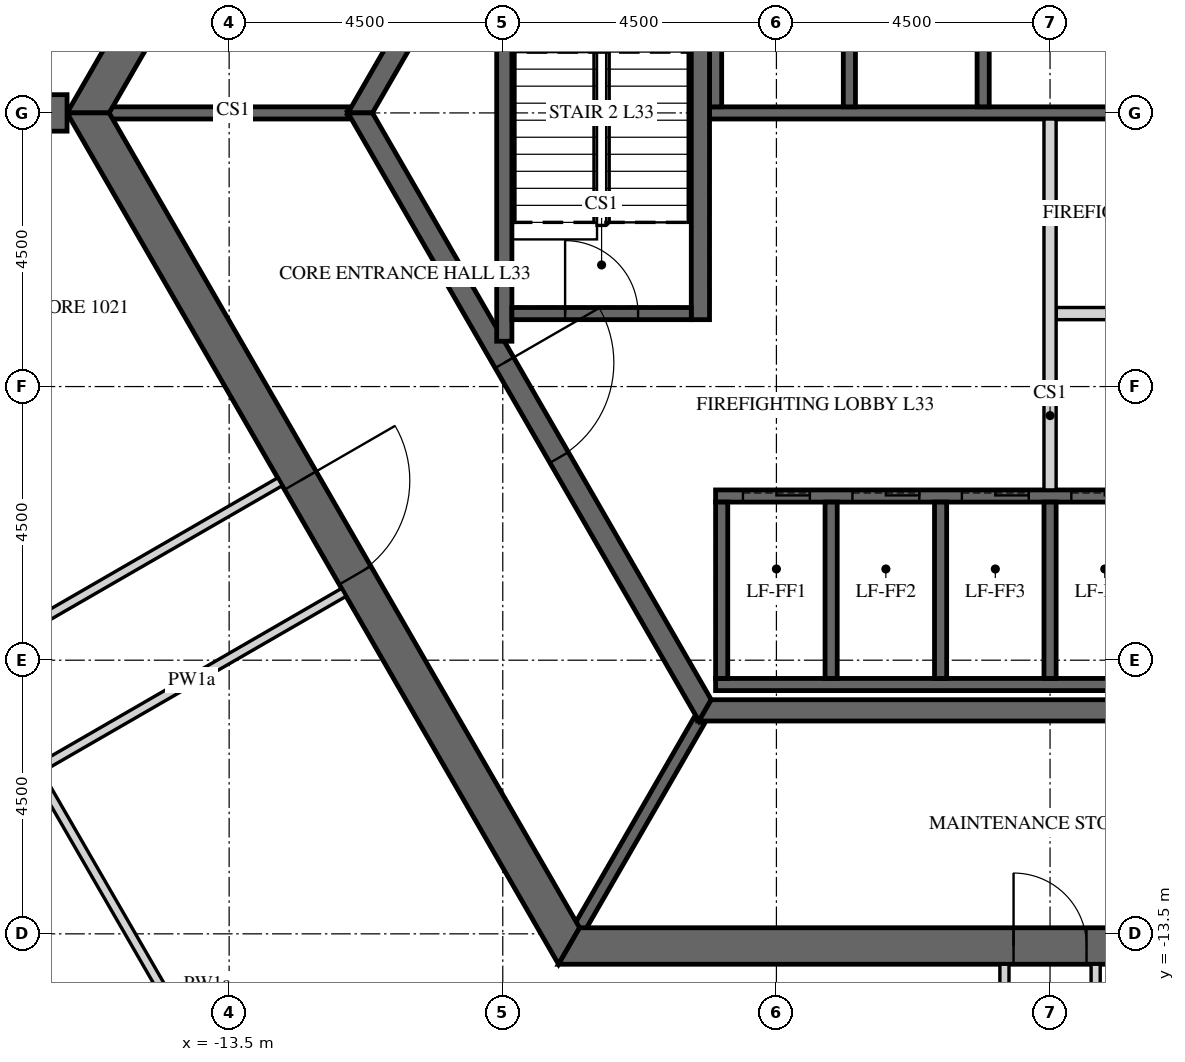
"""IFC4 building model, lengths in metres.
Left out: names, types, materials, properties, quantities, classifications, styles, units other than length and angle.
Written with IfcOpenShell. Run it as: python <this file> out.ifc"""

import sys

from ifc_helpers import new_model, si_unit, direction, frame, frame_2d, origin, place, context, subcontext, project, spatial, polyline, rectangle, outline, extrude, element, fill, save


model = new_model("IFC4")
c1 = context("Model", 3, precision=1e-05, world=origin(), true_north=direction((0.0, 1.0)))
c2 = subcontext(c1, "Body", "Model", "MODEL_VIEW")
j1 = project(units=[si_unit("LENGTHUNIT", "METRE"), si_unit("PLANEANGLEUNIT", "RADIAN")], contexts=[c1])
p1 = place(None, origin())
s1 = spatial("IfcSite", under=j1, at=p1, CompositionType="ELEMENT")
p2 = place(p1, origin())
s2 = spatial("IfcBuilding", under=s1, at=p2, CompositionType="ELEMENT")
p3 = place(p2, frame((0.0, 0.0, 142.8)))
s3 = spatial("IfcBuildingStorey", under=s2, at=p3, CompositionType="ELEMENT", Elevation=142.8)
p4 = place(p3, frame((-7.91, 13.7, -0.15), z_axis=(0.0, 0.0, 1.0), x_axis=(-0.499999880136, -0.866025472988, 0.0)))
e1 = element("IfcWall", 1, at=p4, inside=s3, PredefinedType="SHEAR", context=c2, shape_type="SweptSolid", body=[
    extrude(outline(polyline([(-0.173, -0.3), (15.993, -0.3), (15.646, 0.3), (0.173, 0.3), (-0.173, -0.3)])), origin(), (0.0, 0.0, 1.0), 3.75),
])
p5 = place(p4, frame((7.039, 0.0, 0.15)))
e2 = element("IfcOpeningElement", 2, at=p5, cuts=e1, PredefinedType="OPENING", context=c2, shape_type="SweptSolid", body=[
    extrude(rectangle(XDim=1.8, YDim=2.4, at=frame_2d((0.9, 1.2))), frame((0.0, 0.31, 0.0), z_axis=(0.0, -1.0, 0.0), x_axis=(1.0, 0.0, 0.0)), (0.0, 0.0, 1.0), 0.62),
])
p6 = place(p3, frame((-15.819, 0.0, -0.15), z_axis=(0.0, 0.0, 1.0), x_axis=(0.499999880136, -0.866025472988, 0.0)))
e3 = element("IfcWall", 3, at=p6, inside=s3, PredefinedType="SHEAR", context=c2, shape_type="SweptSolid", body=[
    extrude(outline(polyline([(-0.173, -0.3), (15.993, -0.3), (15.646, 0.3), (0.173, 0.3), (-0.173, -0.3)])), origin(), (0.0, 0.0, 1.0), 3.75),
])
p7 = place(p6, frame((6.981, 0.0, 0.15)))
e4 = element("IfcOpeningElement", 4, at=p7, cuts=e3, PredefinedType="OPENING", context=c2, shape_type="SweptSolid", body=[
    extrude(rectangle(XDim=1.8, YDim=2.4, at=frame_2d((0.9, 1.2))), frame((0.0, 0.31, 0.0), z_axis=(0.0, -1.0, 0.0), x_axis=(1.0, 0.0, 0.0)), (0.0, 0.0, 1.0), 0.62),
])
p8 = place(p3, frame((-7.91, -13.7, -0.15), z_axis=(0.0, 0.0, 1.0), x_axis=(1.0, 0.0, 0.0)))
e5 = element("IfcWall", 5, at=p8, inside=s3, PredefinedType="SHEAR", context=c2, shape_type="SweptSolid", body=[
    extrude(outline(polyline([(-0.173, -0.3), (15.993, -0.3), (15.646, 0.3), (0.173, 0.3), (-0.173, -0.3)])), origin(), (0.0, 0.0, 1.0), 3.75),
])
p9 = place(p8, frame((7.31, 0.0, 0.15)))
e6 = element("IfcOpeningElement", 6, at=p9, cuts=e5, PredefinedType="OPENING", context=c2, shape_type="SweptSolid", body=[
    extrude(rectangle(XDim=1.2, YDim=2.4, at=frame_2d((0.6, 1.2))), frame((0.0, 0.31, 0.0), z_axis=(0.0, -1.0, 0.0), x_axis=(1.0, 0.0, 0.0)), (0.0, 0.0, 1.0), 0.62),
])
p10 = place(p3, frame((-16.166, 0.0, -0.15), z_axis=(0.0, 0.0, 1.0), x_axis=(-1.0, 0.0, 0.0)))
e7 = element("IfcWall", 7, at=p10, inside=s3, PredefinedType="SHEAR", context=c2, shape_type="SweptSolid", body=[
    extrude(rectangle(XDim=16.509, YDim=0.6, at=frame_2d((8.254, 0.0))), origin(), (0.0, 0.0, 1.0), 3.75),
])
p11 = place(p10, frame((7.354, 0.0, 0.15)))
e8 = element("IfcOpeningElement", 8, at=p11, cuts=e7, PredefinedType="OPENING", context=c2, shape_type="SweptSolid", body=[
    extrude(rectangle(XDim=1.8, YDim=2.4, at=frame_2d((0.9, 1.2))), frame((0.0, 0.31, 0.0), z_axis=(0.0, -1.0, 0.0), x_axis=(1.0, 0.0, 0.0)), (0.0, 0.0, 1.0), 0.62),
])
p12 = place(p3, frame((-5.673, 9.825, -0.15), z_axis=(0.0, 0.0, 1.0), x_axis=(-0.499995046907, -0.866028263435, 0.0)))
e9 = element("IfcWall", 9, at=p12, inside=s3, PredefinedType="SHEAR", context=c2, shape_type="SweptSolid", body=[
    extrude(outline(polyline([(-0.101, -0.175), (11.446, -0.175), (11.244, 0.175), (0.101, 0.175), (-0.101, -0.175)])), origin(), (0.0, 0.0, 1.0), 3.75),
])
p13 = place(p12, frame((4.801, 0.0, 0.15)))
e10 = element("IfcOpeningElement", 10, at=p13, cuts=e9, PredefinedType="OPENING", context=c2, shape_type="SweptSolid", body=[
    extrude(rectangle(XDim=1.8, YDim=2.4, at=frame_2d((0.9, 1.2))), frame((0.0, 0.185, 0.0), z_axis=(0.0, -1.0, 0.0), x_axis=(1.0, 0.0, 0.0)), (0.0, 0.0, 1.0), 0.37),
])
p14 = place(p3, frame((-11.345, 0.0, -0.15), z_axis=(0.0, 0.0, 1.0), x_axis=(0.499995046907, -0.866028263435, 0.0)))
e11 = element("IfcWall", 11, at=p14, inside=s3, PredefinedType="SHEAR", context=c2, shape_type="SweptSolid", body=[
    extrude(outline(polyline([(-0.101, -0.175), (11.446, -0.175), (11.244, 0.175), (0.101, 0.175), (-0.101, -0.175)])), origin(), (0.0, 0.0, 1.0), 3.75),
])
p15 = place(p14, frame((4.744, 0.0, 0.15)))
e12 = element("IfcOpeningElement", 12, at=p15, cuts=e11, PredefinedType="OPENING", context=c2, shape_type="SweptSolid", body=[
    extrude(rectangle(XDim=1.8, YDim=2.4, at=frame_2d((0.9, 1.2))), frame((0.0, 0.185, 0.0), z_axis=(0.0, -1.0, 0.0), x_axis=(1.0, 0.0, 0.0)), (0.0, 0.0, 1.0), 0.37),
])
p16 = place(p3, frame((-5.673, -9.825, -0.15), z_axis=(0.0, 0.0, 1.0), x_axis=(1.0, 0.0, 0.0)))
e13 = element("IfcWall", 13, at=p16, inside=s3, PredefinedType="SHEAR", context=c2, shape_type="SweptSolid", body=[
    extrude(outline(polyline([(-0.101, -0.175), (11.446, -0.175), (11.244, 0.175), (0.101, 0.175), (-0.101, -0.175)])), origin(), (0.0, 0.0, 1.0), 3.75),
])
p17 = place(p3, frame((-5.6, 0.0, -0.25), z_axis=(0.0, 0.0, 1.0), x_axis=(1.0, 0.0, 0.0)))
e14 = element("IfcWall", 14, at=p17, inside=s3, PredefinedType="SHEAR", context=c2, shape_type="SweptSolid", body=[
    extrude(rectangle(XDim=11.2, YDim=0.2, at=frame_2d((5.6, 0.0))), origin(), (0.0, 0.0, 1.0), 3.9),
])
for number, where, z_axis, x_axis in (
    (15, (-5.5, 0.1, -0.25), (0.0, 0.0, 1.0), (0.0, 1.0, 0.0)),
    (16, (-3.3, 0.1, -0.25), (0.0, 0.0, 1.0), (0.0, 1.0, 0.0)),
    (17, (-1.1, 0.1, -0.25), (0.0, 0.0, 1.0), (0.0, 1.0, 0.0)),
):
    element("IfcWall", number, at=place(p3, frame(where, z_axis=z_axis, x_axis=x_axis)), inside=s3, PredefinedType="SHEAR", context=c2, shape_type="SweptSolid", body=[
        extrude(rectangle(XDim=3.1, YDim=0.2, at=frame_2d((1.55, 0.0))), origin(), (0.0, 0.0, 1.0), 3.9),
    ])
p18 = place(p3, frame((-5.5, -6.3, -0.25), z_axis=(0.0, 0.0, 1.0), x_axis=(1.0, 0.0, 0.0)))
e18 = element("IfcWall", 18, at=p18, inside=s3, PredefinedType="SHEAR", context=c2, shape_type="SweptSolid", body=[
    extrude(rectangle(XDim=9.2, YDim=0.2, at=frame_2d((4.6, 0.0))), origin(), (0.0, 0.0, 1.0), 3.9),
])
p19 = place(p18, frame((0.45, 0.0, 0.25)))
e19 = element("IfcOpeningElement", 19, at=p19, cuts=e18, PredefinedType="OPENING", context=c2, shape_type="SweptSolid", body=[
    extrude(rectangle(XDim=1.1, YDim=2.1, at=frame_2d((0.55, 1.05))), frame((0.0, 0.11, 0.0), z_axis=(0.0, -1.0, 0.0), x_axis=(1.0, 0.0, 0.0)), (0.0, 0.0, 1.0), 0.22),
])
p20 = place(p18, frame((2.25, 0.0, 0.25)))
e20 = element("IfcOpeningElement", 20, at=p20, cuts=e18, PredefinedType="OPENING", context=c2, shape_type="SweptSolid", body=[
    extrude(rectangle(XDim=1.1, YDim=2.1, at=frame_2d((0.55, 1.05))), frame((0.0, 0.11, 0.0), z_axis=(0.0, -1.0, 0.0), x_axis=(1.0, 0.0, 0.0)), (0.0, 0.0, 1.0), 0.22),
])
p21 = place(p18, frame((4.05, 0.0, 0.25)))
e21 = element("IfcOpeningElement", 21, at=p21, cuts=e18, PredefinedType="OPENING", context=c2, shape_type="SweptSolid", body=[
    extrude(rectangle(XDim=1.1, YDim=2.1, at=frame_2d((0.55, 1.05))), frame((0.0, 0.11, 0.0), z_axis=(0.0, -1.0, 0.0), x_axis=(1.0, 0.0, 0.0)), (0.0, 0.0, 1.0), 0.22),
])
p22 = place(p18, frame((5.85, 0.0, 0.25)))
e22 = element("IfcOpeningElement", 22, at=p22, cuts=e18, PredefinedType="OPENING", context=c2, shape_type="SweptSolid", body=[
    extrude(rectangle(XDim=1.1, YDim=2.1, at=frame_2d((0.55, 1.05))), frame((0.0, 0.11, 0.0), z_axis=(0.0, -1.0, 0.0), x_axis=(1.0, 0.0, 0.0)), (0.0, 0.0, 1.0), 0.22),
])
p23 = place(p18, frame((7.65, 0.0, 0.25)))
e23 = element("IfcOpeningElement", 23, at=p23, cuts=e18, PredefinedType="OPENING", context=c2, shape_type="SweptSolid", body=[
    extrude(rectangle(XDim=1.1, YDim=2.1, at=frame_2d((0.55, 1.05))), frame((0.0, 0.11, 0.0), z_axis=(0.0, -1.0, 0.0), x_axis=(1.0, 0.0, 0.0)), (0.0, 0.0, 1.0), 0.22),
])
p24 = place(p3, frame((-5.5, -9.4, -0.25), z_axis=(0.0, 0.0, 1.0), x_axis=(1.0, 0.0, 0.0)))
e24 = element("IfcWall", 24, at=p24, inside=s3, PredefinedType="SHEAR", context=c2, shape_type="SweptSolid", body=[
    extrude(rectangle(XDim=9.2, YDim=0.2, at=frame_2d((4.6, 0.0))), origin(), (0.0, 0.0, 1.0), 3.9),
])
for number, where, z_axis, x_axis in (
    (25, (-5.4, -9.3, -0.25), (0.0, 0.0, 1.0), (0.0, 1.0, 0.0)),
    (26, (-3.6, -9.3, -0.25), (0.0, 0.0, 1.0), (0.0, 1.0, 0.0)),
    (27, (-1.8, -9.3, -0.25), (0.0, 0.0, 1.0), (0.0, 1.0, 0.0)),
    (28, (0.0, -9.3, -0.25), (0.0, 0.0, 1.0), (0.0, 1.0, 0.0)),
):
    element("IfcWall", number, at=place(p3, frame(where, z_axis=z_axis, x_axis=x_axis)), inside=s3, PredefinedType="SHEAR", context=c2, shape_type="SweptSolid", body=[
        extrude(rectangle(XDim=2.9, YDim=0.2, at=frame_2d((1.45, 0.0))), origin(), (0.0, 0.0, 1.0), 3.9),
    ])
p25 = place(p3, frame((0.1, -3.3, 0.0), z_axis=(0.0, 0.0, 1.0), x_axis=(1.0, 0.0, 0.0)))
e29 = element("IfcWall", 29, at=p25, inside=s3, PredefinedType="PARTITIONING", context=c2, shape_type="SweptSolid", body=[
    extrude(rectangle(XDim=5.5, YDim=0.2, at=frame_2d((2.75, 0.0))), origin(), (0.0, 0.0, 1.0), 3.65),
])
p26 = place(p25, frame((2.3, 0.0, 0.0)))
e30 = element("IfcOpeningElement", 30, at=p26, cuts=e29, PredefinedType="OPENING", context=c2, shape_type="SweptSolid", body=[
    extrude(rectangle(XDim=0.9, YDim=2.1, at=frame_2d((0.45, 1.05))), frame((0.0, 0.11, 0.0), z_axis=(0.0, -1.0, 0.0), x_axis=(1.0, 0.0, 0.0)), (0.0, 0.0, 1.0), 0.22),
])
p27 = place(p3, frame((0.0, -6.2, 0.0), z_axis=(0.0, 0.0, 1.0), x_axis=(0.0, 1.0, 0.0)))
e31 = element("IfcWall", 31, at=p27, inside=s3, PredefinedType="PARTITIONING", context=c2, shape_type="SweptSolid", body=[
    extrude(rectangle(XDim=6.1, YDim=0.2, at=frame_2d((3.05, 0.0))), origin(), (0.0, 0.0, 1.0), 3.65),
])
p28 = place(p3, frame((-11.547, 0.0, -0.15), z_axis=(0.0, 0.0, 1.0), x_axis=(-1.0, 0.0, 0.0)))
e32 = element("IfcWall", 32, at=p28, inside=s3, PredefinedType="SHEAR", context=c2, shape_type="SweptSolid", body=[
    extrude(rectangle(XDim=3.926, YDim=0.2, at=frame_2d((1.963, 0.0))), origin(), (0.0, 0.0, 1.0), 3.75),
])
p29 = place(p3, frame((-5.773, -10.0, -0.15), z_axis=(0.0, 0.0, 1.0), x_axis=(-0.500038251005, -0.86600331843, 0.0)))
e33 = element("IfcWall", 33, at=p29, inside=s3, PredefinedType="SHEAR", context=c2, shape_type="SweptSolid", body=[
    extrude(rectangle(XDim=3.926, YDim=0.2, at=frame_2d((1.963, 0.0))), origin(), (0.0, 0.0, 1.0), 3.75),
])
p30 = place(p3, frame((-5.75, -3.4, -0.25), z_axis=(0.0, 0.0, 1.0), x_axis=(0.0, 1.0, 0.0)))
e34 = element("IfcWall", 34, at=p30, inside=s3, PredefinedType="SHEAR", context=c2, shape_type="SweptSolid", body=[
    extrude(rectangle(XDim=6.8, YDim=0.3, at=frame_2d((3.4, 0.0))), origin(), (0.0, 0.0, 1.0), 3.9),
])
p31 = place(p3, frame((-8.975, -3.755, -0.25), z_axis=(0.0, 0.0, 1.0), x_axis=(0.0, 1.0, 0.0)))
e35 = element("IfcWall", 35, at=p31, inside=s3, PredefinedType="SHEAR", context=c2, shape_type="SweptSolid", body=[
    extrude(rectangle(XDim=7.51, YDim=0.25, at=frame_2d((3.755, 0.0))), origin(), (0.0, 0.0, 1.0), 3.9),
])
p32 = place(p3, frame((-8.85, -3.3, -0.25), z_axis=(0.0, 0.0, 1.0), x_axis=(1.0, 0.0, 0.0)))
e36 = element("IfcWall", 36, at=p32, inside=s3, PredefinedType="SHEAR", context=c2, shape_type="SweptSolid", body=[
    extrude(rectangle(XDim=2.95, YDim=0.2, at=frame_2d((1.475, 0.0))), origin(), (0.0, 0.0, 1.0), 3.9),
])
p33 = place(p32, frame((0.875, 0.0, 0.25)))
e37 = element("IfcOpeningElement", 37, at=p33, cuts=e36, PredefinedType="OPENING", context=c2, shape_type="SweptSolid", body=[
    extrude(rectangle(XDim=1.2, YDim=2.4, at=frame_2d((0.6, 1.2))), frame((0.0, 0.11, 0.0), z_axis=(0.0, -1.0, 0.0), x_axis=(1.0, 0.0, 0.0)), (0.0, 0.0, 1.0), 0.22),
])
p34 = place(p3, frame((-23.743, -2.175, 0.0), z_axis=(0.0, 0.0, 1.0), x_axis=(0.499992353047, -0.86602981871, 0.0)))
e38 = element("IfcWall", 38, at=p34, inside=s3, PredefinedType="PARTITIONING", context=c2, shape_type="SweptSolid", body=[
    extrude(rectangle(XDim=23.516, YDim=0.15, at=frame_2d((11.758, 0.0))), origin(), (0.0, 0.0, 1.0), 2.838),
])
p35 = place(p34, frame((10.099, 0.0, 0.0)))
e39 = element("IfcOpeningElement", 39, at=p35, cuts=e38, PredefinedType="OPENING", context=c2, shape_type="SweptSolid", body=[
    extrude(rectangle(XDim=1.0, YDim=2.1, at=frame_2d((0.5, 1.05))), frame((0.0, 0.085, 0.0), z_axis=(0.0, -1.0, 0.0), x_axis=(1.0, 0.0, 0.0)), (0.0, 0.0, 1.0), 0.17),
])
p36 = place(p34, frame((17.358, 0.0, 0.0)))
e40 = element("IfcOpeningElement", 40, at=p36, cuts=e38, PredefinedType="OPENING", context=c2, shape_type="SweptSolid", body=[
    extrude(rectangle(XDim=1.0, YDim=2.1, at=frame_2d((0.5, 1.05))), frame((0.0, 0.085, 0.0), z_axis=(0.0, -1.0, 0.0), x_axis=(1.0, 0.0, 0.0)), (0.0, 0.0, 1.0), 0.17),
])
p37 = place(p3, frame((-12.664, -6.066, 0.0), z_axis=(0.0, 0.0, 1.0), x_axis=(-0.866018092707, -0.500012662943, 0.0)))
e41 = element("IfcWall", 41, at=p37, inside=s3, PredefinedType="PARTITIONING", context=c2, shape_type="SweptSolid", body=[
    extrude(rectangle(XDim=5.85, YDim=0.15, at=frame_2d((2.925, 0.0))), origin(), (0.0, 0.0, 1.0), 2.838),
])
p38 = place(p3, frame((-0.75, -14.0, 0.0), z_axis=(0.0, 0.0, 1.0), x_axis=(0.0, -1.0, 0.0)))
e42 = element("IfcWall", 42, at=p38, inside=s3, PredefinedType="PARTITIONING", context=c2, shape_type="SweptSolid", body=[
    extrude(rectangle(XDim=5.951, YDim=0.15, at=frame_2d((2.976, 0.0))), origin(), (0.0, 0.0, 1.0), 2.838),
])
p39 = place(p3, frame((-11.031, -20.595, 0.0), z_axis=(0.0, 0.0, 1.0), x_axis=(-0.499987422378, 0.866032665356, 0.0)))
e43 = element("IfcWall", 43, at=p39, inside=s3, PredefinedType="PARTITIONING", context=c2, shape_type="SweptSolid", body=[
    extrude(rectangle(XDim=11.299, YDim=0.15, at=frame_2d((5.649, 0.0))), origin(), (0.0, 0.0, 1.0), 2.838),
])
p40 = place(p39, frame((5.199, 0.0, 0.0)))
e44 = element("IfcOpeningElement", 44, at=p40, cuts=e43, PredefinedType="OPENING", context=c2, shape_type="SweptSolid", body=[
    extrude(rectangle(XDim=0.9, YDim=2.1, at=frame_2d((0.45, 1.05))), frame((0.0, 0.085, 0.0), z_axis=(0.0, -1.0, 0.0), x_axis=(1.0, 0.0, 0.0)), (0.0, 0.0, 1.0), 0.17),
])
p41 = place(p3, frame((-16.615, -10.772, 0.0), z_axis=(0.0, 0.0, 1.0), x_axis=(0.866025774745, 0.499999357477, 0.0)))
e45 = element("IfcWall", 45, at=p41, inside=s3, PredefinedType="PARTITIONING", context=c2, shape_type="SweptSolid", body=[
    extrude(rectangle(XDim=5.775, YDim=0.15, at=frame_2d((2.887, 0.0))), origin(), (0.0, 0.0, 1.0), 2.838),
])
p42 = place(p3, frame((0.75, -19.771, 0.0), z_axis=(0.0, 0.0, 1.0), x_axis=(0.0, 1.0, 0.0)))
e46 = element("IfcWall", 46, at=p42, inside=s3, PredefinedType="PARTITIONING", context=c2, shape_type="SweptSolid", body=[
    extrude(rectangle(XDim=5.771, YDim=0.15, at=frame_2d((2.885, 0.0))), origin(), (0.0, 0.0, 1.0), 2.838),
])
p43 = place(p7, origin())
e47 = element("IfcDoor", 47, at=p43, inside=s3, OperationType="DOUBLE_DOOR_SINGLE_SWING", PredefinedType="DOOR", context=c2, shape_type="SweptSolid", body=[
    extrude(rectangle(XDim=1.8, YDim=2.4, at=frame_2d((0.9, 1.2))), frame((0.0, 0.025, 0.0), z_axis=(0.0, -1.0, 0.0), x_axis=(1.0, 0.0, 0.0)), (0.0, 0.0, 1.0), 0.05),
])
fill(e4, e47)
p44 = place(p9, origin())
e48 = element("IfcDoor", 48, at=p44, inside=s3, OperationType="SINGLE_SWING_LEFT", PredefinedType="DOOR", context=c2, shape_type="SweptSolid", body=[
    extrude(rectangle(XDim=1.2, YDim=2.4, at=frame_2d((0.6, 1.2))), frame((0.0, 0.025, 0.0), z_axis=(0.0, -1.0, 0.0), x_axis=(1.0, 0.0, 0.0)), (0.0, 0.0, 1.0), 0.05),
])
fill(e6, e48)
p45 = place(p15, origin())
e49 = element("IfcDoor", 49, at=p45, inside=s3, OperationType="DOUBLE_DOOR_SINGLE_SWING", PredefinedType="DOOR", context=c2, shape_type="SweptSolid", body=[
    extrude(rectangle(XDim=1.8, YDim=2.4, at=frame_2d((0.9, 1.2))), frame((0.0, 0.025, 0.0), z_axis=(0.0, -1.0, 0.0), x_axis=(1.0, 0.0, 0.0)), (0.0, 0.0, 1.0), 0.05),
])
fill(e12, e49)
p46 = place(p33, origin())
e50 = element("IfcDoor", 50, at=p46, inside=s3, OperationType="SINGLE_SWING_LEFT", PredefinedType="DOOR", context=c2, shape_type="SweptSolid", body=[
    extrude(rectangle(XDim=1.2, YDim=2.4, at=frame_2d((0.6, 1.2))), frame((0.0, 0.025, 0.0), z_axis=(0.0, -1.0, 0.0), x_axis=(1.0, 0.0, 0.0)), (0.0, 0.0, 1.0), 0.05),
])
fill(e37, e50)
p47 = place(p19, origin())
e51 = element("IfcDoor", 51, at=p47, inside=s3, OperationType="SLIDING_TO_LEFT", PredefinedType="DOOR", context=c2, shape_type="SweptSolid", body=[
    extrude(rectangle(XDim=1.1, YDim=2.1, at=frame_2d((0.55, 1.05))), frame((0.0, 0.025, 0.0), z_axis=(0.0, -1.0, 0.0), x_axis=(1.0, 0.0, 0.0)), (0.0, 0.0, 1.0), 0.05),
])
fill(e19, e51)
p48 = place(p20, origin())
e52 = element("IfcDoor", 52, at=p48, inside=s3, OperationType="SLIDING_TO_LEFT", PredefinedType="DOOR", context=c2, shape_type="SweptSolid", body=[
    extrude(rectangle(XDim=1.1, YDim=2.1, at=frame_2d((0.55, 1.05))), frame((0.0, 0.025, 0.0), z_axis=(0.0, -1.0, 0.0), x_axis=(1.0, 0.0, 0.0)), (0.0, 0.0, 1.0), 0.05),
])
fill(e20, e52)
p49 = place(p21, origin())
e53 = element("IfcDoor", 53, at=p49, inside=s3, OperationType="SLIDING_TO_LEFT", PredefinedType="DOOR", context=c2, shape_type="SweptSolid", body=[
    extrude(rectangle(XDim=1.1, YDim=2.1, at=frame_2d((0.55, 1.05))), frame((0.0, 0.025, 0.0), z_axis=(0.0, -1.0, 0.0), x_axis=(1.0, 0.0, 0.0)), (0.0, 0.0, 1.0), 0.05),
])
fill(e21, e53)
p50 = place(p22, origin())
e54 = element("IfcDoor", 54, at=p50, inside=s3, OperationType="SLIDING_TO_LEFT", PredefinedType="DOOR", context=c2, shape_type="SweptSolid", body=[
    extrude(rectangle(XDim=1.1, YDim=2.1, at=frame_2d((0.55, 1.05))), frame((0.0, 0.025, 0.0), z_axis=(0.0, -1.0, 0.0), x_axis=(1.0, 0.0, 0.0)), (0.0, 0.0, 1.0), 0.05),
])
fill(e22, e54)
save(model, sys.argv[1])
